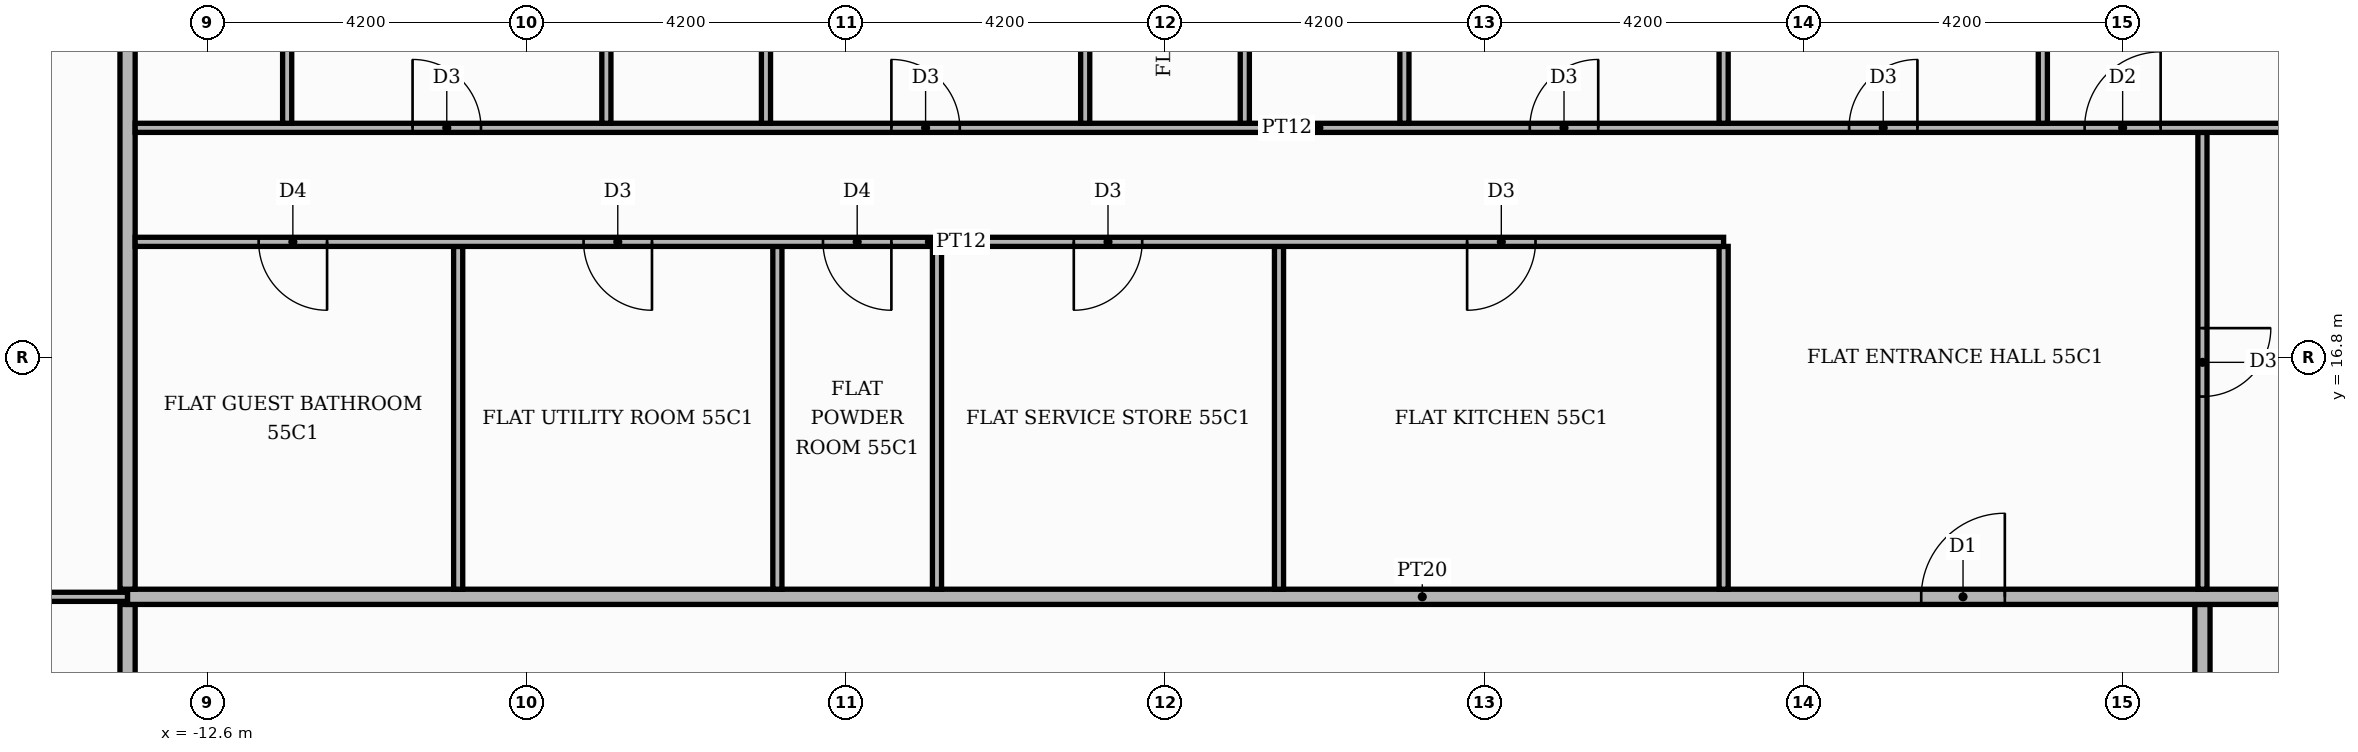
"""IFC4 building model, lengths in metres.
Left out: names, types, materials, properties, quantities, classifications, styles, units other than length and angle.
Written with IfcOpenShell. Run it as: python <this file> out.ifc"""

import sys

from ifc_helpers import new_model, si_unit, direction, frame, frame_2d, origin, place, context, subcontext, project, spatial, rectangle, extrude, element, fill, save


model = new_model("IFC4")
c1 = context("Model", 3, precision=1e-05, world=origin(), true_north=direction((0.0, 1.0)))
c2 = subcontext(c1, "Body", "Model", "MODEL_VIEW")
j1 = project(units=[si_unit("LENGTHUNIT", "METRE"), si_unit("PLANEANGLEUNIT", "RADIAN")], contexts=[c1])
p1 = place(None, origin())
s1 = spatial("IfcSite", under=j1, at=p1, CompositionType="ELEMENT")
p2 = place(p1, origin())
s2 = spatial("IfcBuilding", under=s1, at=p2, CompositionType="ELEMENT")
p3 = place(p2, frame((0.0, 0.0, 231.3)))
s3 = spatial("IfcBuildingStorey", under=s2, at=p3, CompositionType="ELEMENT", Elevation=231.3)
p4 = place(p3, frame((-13.65, -13.55, 0.0), z_axis=(0.0, 0.0, 1.0), x_axis=(0.0, 1.0, 0.0)))
e1 = element("IfcWall", 1, at=p4, inside=s3, PredefinedType="PARTITIONING", context=c2, shape_type="SweptSolid", body=[
    extrude(rectangle(XDim=27.1, YDim=0.2, at=frame_2d((13.55, 0.0))), origin(), (0.0, 0.0, 1.0), 3.4),
])
p5 = place(p4, frame((23.5, 0.0, 0.0)))
e2 = element("IfcOpeningElement", 2, at=p5, cuts=e1, PredefinedType="OPENING", context=c2, shape_type="SweptSolid", body=[
    extrude(rectangle(XDim=1.1, YDim=2.4, at=frame_2d((0.55, 1.2))), frame((0.0, 0.11, 0.0), z_axis=(0.0, -1.0, 0.0), x_axis=(1.0, 0.0, 0.0)), (0.0, 0.0, 1.0), 0.22),
])
p6 = place(p3, frame((13.65, 11.1, 0.0), z_axis=(0.0, 0.0, 1.0), x_axis=(0.0, 1.0, 0.0)))
e3 = element("IfcWall", 3, at=p6, inside=s3, PredefinedType="PARTITIONING", context=c2, shape_type="SweptSolid", body=[
    extrude(rectangle(XDim=2.45, YDim=0.2, at=frame_2d((1.225, 0.0))), origin(), (0.0, 0.0, 1.0), 3.4),
])
p7 = place(p3, frame((-20.12, 13.65, 0.0), z_axis=(0.0, 0.0, 1.0), x_axis=(1.0, 0.0, 0.0)))
e4 = element("IfcWall", 4, at=p7, inside=s3, PredefinedType="PARTITIONING", context=c2, shape_type="SweptSolid", body=[
    extrude(rectangle(XDim=6.47, YDim=0.12, at=frame_2d((3.235, 0.0))), origin(), (0.0, 0.0, 1.0), 3.4),
])
p8 = place(p7, frame((2.785, 0.0, 0.0)))
e5 = element("IfcOpeningElement", 5, at=p8, cuts=e4, PredefinedType="OPENING", context=c2, shape_type="SweptSolid", body=[
    extrude(rectangle(XDim=0.9, YDim=2.1, at=frame_2d((0.45, 1.05))), frame((0.0, 0.07, 0.0), z_axis=(0.0, -1.0, 0.0), x_axis=(1.0, 0.0, 0.0)), (0.0, 0.0, 1.0), 0.14),
])
p9 = place(p3, frame((-13.65, 13.65, 0.0), z_axis=(0.0, 0.0, 1.0), x_axis=(1.0, 0.0, 0.0)))
e6 = element("IfcWall", 6, at=p9, inside=s3, PredefinedType="PARTITIONING", context=c2, shape_type="SweptSolid", body=[
    extrude(rectangle(XDim=34.07, YDim=0.2, at=frame_2d((17.035, 0.0))), origin(), (0.0, 0.0, 1.0), 3.4),
])
p10 = place(p9, frame((23.6, 0.0, 0.0)))
e7 = element("IfcOpeningElement", 7, at=p10, cuts=e6, PredefinedType="OPENING", context=c2, shape_type="SweptSolid", body=[
    extrude(rectangle(XDim=1.1, YDim=2.4, at=frame_2d((0.55, 1.2))), frame((0.0, 0.11, 0.0), z_axis=(0.0, -1.0, 0.0), x_axis=(1.0, 0.0, 0.0)), (0.0, 0.0, 1.0), 0.22),
])
p11 = place(p3, frame((-13.65, 13.75, 0.0), z_axis=(0.0, 0.0, 1.0), x_axis=(0.0, 1.0, 0.0)))
e8 = element("IfcWall", 8, at=p11, inside=s3, PredefinedType="PARTITIONING", context=c2, shape_type="SweptSolid", body=[
    extrude(rectangle(XDim=11.67, YDim=0.2, at=frame_2d((5.835, 0.0))), origin(), (0.0, 0.0, 1.0), 3.4),
])
for number, where, z_axis, x_axis in (
    (9, (-9.3, 13.75, 0.0), (0.0, 0.0, 1.0), (0.0, 1.0, 0.0)),
    (10, (-5.1, 13.75, 0.0), (0.0, 0.0, 1.0), (0.0, 1.0, 0.0)),
    (11, (-3.0, 13.75, 0.0), (0.0, 0.0, 1.0), (0.0, 1.0, 0.0)),
    (12, (1.5, 13.75, 0.0), (0.0, 0.0, 1.0), (0.0, 1.0, 0.0)),
    (13, (7.35, 13.75, 0.0), (0.0, 0.0, 1.0), (0.0, 1.0, 0.0)),
):
    element("IfcWall", number, at=place(p3, frame(where, z_axis=z_axis, x_axis=x_axis)), inside=s3, PredefinedType="PARTITIONING", context=c2, shape_type="SweptSolid", body=[
        extrude(rectangle(XDim=4.51, YDim=0.12, at=frame_2d((2.255, 0.0))), origin(), (0.0, 0.0, 1.0), 3.4),
    ])
p12 = place(p3, frame((13.65, 13.75, 0.0), z_axis=(0.0, 0.0, 1.0), x_axis=(0.0, 1.0, 0.0)))
e14 = element("IfcWall", 14, at=p12, inside=s3, PredefinedType="PARTITIONING", context=c2, shape_type="SweptSolid", body=[
    extrude(rectangle(XDim=6.01, YDim=0.12, at=frame_2d((3.005, 0.0))), origin(), (0.0, 0.0, 1.0), 3.4),
])
p13 = place(p12, frame((2.535, 0.0, 0.0)))
e15 = element("IfcOpeningElement", 15, at=p13, cuts=e14, PredefinedType="OPENING", context=c2, shape_type="SweptSolid", body=[
    extrude(rectangle(XDim=0.9, YDim=2.1, at=frame_2d((0.45, 1.05))), frame((0.0, 0.07, 0.0), z_axis=(0.0, -1.0, 0.0), x_axis=(1.0, 0.0, 0.0)), (0.0, 0.0, 1.0), 0.14),
])
p14 = place(p3, frame((-13.55, 18.32, 0.0), z_axis=(0.0, 0.0, 1.0), x_axis=(1.0, 0.0, 0.0)))
e16 = element("IfcWall", 16, at=p14, inside=s3, PredefinedType="PARTITIONING", context=c2, shape_type="SweptSolid", body=[
    extrude(rectangle(XDim=20.9, YDim=0.12, at=frame_2d((10.45, 0.0))), origin(), (0.0, 0.0, 1.0), 3.4),
])
p15 = place(p14, frame((17.525, 0.0, 0.0)))
e17 = element("IfcOpeningElement", 17, at=p15, cuts=e16, PredefinedType="OPENING", context=c2, shape_type="SweptSolid", body=[
    extrude(rectangle(XDim=0.9, YDim=2.1, at=frame_2d((0.45, 1.05))), frame((0.0, 0.07, 0.0), z_axis=(0.0, -1.0, 0.0), x_axis=(1.0, 0.0, 0.0)), (0.0, 0.0, 1.0), 0.14),
])
p16 = place(p14, frame((12.35, 0.0, 0.0)))
e18 = element("IfcOpeningElement", 18, at=p16, cuts=e16, PredefinedType="OPENING", context=c2, shape_type="SweptSolid", body=[
    extrude(rectangle(XDim=0.9, YDim=2.1, at=frame_2d((0.45, 1.05))), frame((0.0, 0.07, 0.0), z_axis=(0.0, -1.0, 0.0), x_axis=(1.0, 0.0, 0.0)), (0.0, 0.0, 1.0), 0.14),
])
p17 = place(p14, frame((9.05, 0.0, 0.0)))
e19 = element("IfcOpeningElement", 19, at=p17, cuts=e16, PredefinedType="OPENING", context=c2, shape_type="SweptSolid", body=[
    extrude(rectangle(XDim=0.9, YDim=2.1, at=frame_2d((0.45, 1.05))), frame((0.0, 0.07, 0.0), z_axis=(0.0, -1.0, 0.0), x_axis=(1.0, 0.0, 0.0)), (0.0, 0.0, 1.0), 0.14),
])
p18 = place(p14, frame((5.9, 0.0, 0.0)))
e20 = element("IfcOpeningElement", 20, at=p18, cuts=e16, PredefinedType="OPENING", context=c2, shape_type="SweptSolid", body=[
    extrude(rectangle(XDim=0.9, YDim=2.1, at=frame_2d((0.45, 1.05))), frame((0.0, 0.07, 0.0), z_axis=(0.0, -1.0, 0.0), x_axis=(1.0, 0.0, 0.0)), (0.0, 0.0, 1.0), 0.14),
])
p19 = place(p14, frame((1.625, 0.0, 0.0)))
e21 = element("IfcOpeningElement", 21, at=p19, cuts=e16, PredefinedType="OPENING", context=c2, shape_type="SweptSolid", body=[
    extrude(rectangle(XDim=0.9, YDim=2.1, at=frame_2d((0.45, 1.05))), frame((0.0, 0.07, 0.0), z_axis=(0.0, -1.0, 0.0), x_axis=(1.0, 0.0, 0.0)), (0.0, 0.0, 1.0), 0.14),
])
p20 = place(p3, frame((-13.55, 19.82, 0.0), z_axis=(0.0, 0.0, 1.0), x_axis=(1.0, 0.0, 0.0)))
e22 = element("IfcWall", 22, at=p20, inside=s3, PredefinedType="PARTITIONING", context=c2, shape_type="SweptSolid", body=[
    extrude(rectangle(XDim=31.15, YDim=0.12, at=frame_2d((15.575, 0.0))), origin(), (0.0, 0.0, 1.0), 3.4),
])
p21 = place(p20, frame((25.65, 0.0, 0.0)))
e23 = element("IfcOpeningElement", 23, at=p21, cuts=e22, PredefinedType="OPENING", context=c2, shape_type="SweptSolid", body=[
    extrude(rectangle(XDim=1.0, YDim=2.1, at=frame_2d((0.5, 1.05))), frame((0.0, 0.07, 0.0), z_axis=(0.0, -1.0, 0.0), x_axis=(1.0, 0.0, 0.0)), (0.0, 0.0, 1.0), 0.14),
])
p22 = place(p20, frame((22.55, 0.0, 0.0)))
e24 = element("IfcOpeningElement", 24, at=p22, cuts=e22, PredefinedType="OPENING", context=c2, shape_type="SweptSolid", body=[
    extrude(rectangle(XDim=0.9, YDim=2.1, at=frame_2d((0.45, 1.05))), frame((0.0, 0.07, 0.0), z_axis=(0.0, -1.0, 0.0), x_axis=(1.0, 0.0, 0.0)), (0.0, 0.0, 1.0), 0.14),
])
p23 = place(p20, frame((18.35, 0.0, 0.0)))
e25 = element("IfcOpeningElement", 25, at=p23, cuts=e22, PredefinedType="OPENING", context=c2, shape_type="SweptSolid", body=[
    extrude(rectangle(XDim=0.9, YDim=2.1, at=frame_2d((0.45, 1.05))), frame((0.0, 0.07, 0.0), z_axis=(0.0, -1.0, 0.0), x_axis=(1.0, 0.0, 0.0)), (0.0, 0.0, 1.0), 0.14),
])
p24 = place(p20, frame((9.95, 0.0, 0.0)))
e26 = element("IfcOpeningElement", 26, at=p24, cuts=e22, PredefinedType="OPENING", context=c2, shape_type="SweptSolid", body=[
    extrude(rectangle(XDim=0.9, YDim=2.1, at=frame_2d((0.45, 1.05))), frame((0.0, 0.07, 0.0), z_axis=(0.0, -1.0, 0.0), x_axis=(1.0, 0.0, 0.0)), (0.0, 0.0, 1.0), 0.14),
])
p25 = place(p20, frame((3.65, 0.0, 0.0)))
e27 = element("IfcOpeningElement", 27, at=p25, cuts=e22, PredefinedType="OPENING", context=c2, shape_type="SweptSolid", body=[
    extrude(rectangle(XDim=0.9, YDim=2.1, at=frame_2d((0.45, 1.05))), frame((0.0, 0.07, 0.0), z_axis=(0.0, -1.0, 0.0), x_axis=(1.0, 0.0, 0.0)), (0.0, 0.0, 1.0), 0.14),
])
p26 = place(p3, frame((-11.55, 19.88, 0.0), z_axis=(0.0, 0.0, 1.0), x_axis=(0.0, 1.0, 0.0)))
e28 = element("IfcWall", 28, at=p26, inside=s3, PredefinedType="PARTITIONING", context=c2, shape_type="SweptSolid", body=[
    extrude(rectangle(XDim=5.54, YDim=0.12, at=frame_2d((2.77, 0.0))), origin(), (0.0, 0.0, 1.0), 3.4),
])
p27 = place(p26, frame((2.44, 0.0, 0.0)))
e29 = element("IfcOpeningElement", 29, at=p27, cuts=e28, PredefinedType="OPENING", context=c2, shape_type="SweptSolid", body=[
    extrude(rectangle(XDim=0.9, YDim=2.1, at=frame_2d((0.45, 1.05))), frame((0.0, 0.07, 0.0), z_axis=(0.0, -1.0, 0.0), x_axis=(1.0, 0.0, 0.0)), (0.0, 0.0, 1.0), 0.14),
])
p28 = place(p3, frame((-7.35, 19.88, 0.0), z_axis=(0.0, 0.0, 1.0), x_axis=(0.0, 1.0, 0.0)))
e30 = element("IfcWall", 30, at=p28, inside=s3, PredefinedType="PARTITIONING", context=c2, shape_type="SweptSolid", body=[
    extrude(rectangle(XDim=5.54, YDim=0.12, at=frame_2d((2.77, 0.0))), origin(), (0.0, 0.0, 1.0), 3.4),
])
p29 = place(p3, frame((-5.25, 19.88, 0.0), z_axis=(0.0, 0.0, 1.0), x_axis=(0.0, 1.0, 0.0)))
e31 = element("IfcWall", 31, at=p29, inside=s3, PredefinedType="PARTITIONING", context=c2, shape_type="SweptSolid", body=[
    extrude(rectangle(XDim=5.54, YDim=0.12, at=frame_2d((2.77, 0.0))), origin(), (0.0, 0.0, 1.0), 3.4),
])
p30 = place(p29, frame((2.44, 0.0, 0.0)))
e32 = element("IfcOpeningElement", 32, at=p30, cuts=e31, PredefinedType="OPENING", context=c2, shape_type="SweptSolid", body=[
    extrude(rectangle(XDim=0.9, YDim=2.1, at=frame_2d((0.45, 1.05))), frame((0.0, 0.07, 0.0), z_axis=(0.0, -1.0, 0.0), x_axis=(1.0, 0.0, 0.0)), (0.0, 0.0, 1.0), 0.14),
])
p31 = place(p3, frame((-1.05, 19.88, 0.0), z_axis=(0.0, 0.0, 1.0), x_axis=(0.0, 1.0, 0.0)))
e33 = element("IfcWall", 33, at=p31, inside=s3, PredefinedType="PARTITIONING", context=c2, shape_type="SweptSolid", body=[
    extrude(rectangle(XDim=5.54, YDim=0.12, at=frame_2d((2.77, 0.0))), origin(), (0.0, 0.0, 1.0), 3.4),
])
p32 = place(p3, frame((1.05, 19.88, 0.0), z_axis=(0.0, 0.0, 1.0), x_axis=(0.0, 1.0, 0.0)))
e34 = element("IfcWall", 34, at=p32, inside=s3, PredefinedType="PARTITIONING", context=c2, shape_type="SweptSolid", body=[
    extrude(rectangle(XDim=5.54, YDim=0.12, at=frame_2d((2.77, 0.0))), origin(), (0.0, 0.0, 1.0), 3.4),
])
p33 = place(p32, frame((2.44, 0.0, 0.0)))
e35 = element("IfcOpeningElement", 35, at=p33, cuts=e34, PredefinedType="OPENING", context=c2, shape_type="SweptSolid", body=[
    extrude(rectangle(XDim=0.9, YDim=2.1, at=frame_2d((0.45, 1.05))), frame((0.0, 0.07, 0.0), z_axis=(0.0, -1.0, 0.0), x_axis=(1.0, 0.0, 0.0)), (0.0, 0.0, 1.0), 0.14),
])
p34 = place(p3, frame((3.15, 19.88, 0.0), z_axis=(0.0, 0.0, 1.0), x_axis=(0.0, 1.0, 0.0)))
e36 = element("IfcWall", 36, at=p34, inside=s3, PredefinedType="PARTITIONING", context=c2, shape_type="SweptSolid", body=[
    extrude(rectangle(XDim=5.54, YDim=0.12, at=frame_2d((2.77, 0.0))), origin(), (0.0, 0.0, 1.0), 3.4),
])
p35 = place(p34, frame((2.44, 0.0, 0.0)))
e37 = element("IfcOpeningElement", 37, at=p35, cuts=e36, PredefinedType="OPENING", context=c2, shape_type="SweptSolid", body=[
    extrude(rectangle(XDim=0.9, YDim=2.1, at=frame_2d((0.45, 1.05))), frame((0.0, 0.07, 0.0), z_axis=(0.0, -1.0, 0.0), x_axis=(1.0, 0.0, 0.0)), (0.0, 0.0, 1.0), 0.14),
])
for number, where, z_axis, x_axis in (
    (38, (7.35, 19.88, 0.0), (0.0, 0.0, 1.0), (0.0, 1.0, 0.0)),
    (39, (11.55, 19.88, 0.0), (0.0, 0.0, 1.0), (0.0, 1.0, 0.0)),
):
    element("IfcWall", number, at=place(p3, frame(where, z_axis=z_axis, x_axis=x_axis)), inside=s3, PredefinedType="PARTITIONING", context=c2, shape_type="SweptSolid", body=[
        extrude(rectangle(XDim=5.54, YDim=0.12, at=frame_2d((2.77, 0.0))), origin(), (0.0, 0.0, 1.0), 3.4),
    ])
p36 = place(p10, origin())
e40 = element("IfcDoor", 40, at=p36, inside=s3, OperationType="SINGLE_SWING_RIGHT", PredefinedType="DOOR", context=c2, shape_type="SweptSolid", body=[
    extrude(rectangle(XDim=1.1, YDim=2.4, at=frame_2d((0.55, 1.2))), frame((0.0, 0.025, 0.0), z_axis=(0.0, -1.0, 0.0), x_axis=(1.0, 0.0, 0.0)), (0.0, 0.0, 1.0), 0.05),
])
fill(e7, e40)
p37 = place(p13, frame((0.9, 0.0, 0.0), z_axis=(0.0, 0.0, 1.0), x_axis=(-1.0, 0.0, 0.0)))
e41 = element("IfcDoor", 41, at=p37, inside=s3, OperationType="SINGLE_SWING_RIGHT", PredefinedType="DOOR", context=c2, shape_type="SweptSolid", body=[
    extrude(rectangle(XDim=0.9, YDim=2.1, at=frame_2d((0.45, 1.05))), frame((0.0, 0.025, 0.0), z_axis=(0.0, -1.0, 0.0), x_axis=(1.0, 0.0, 0.0)), (0.0, 0.0, 1.0), 0.05),
])
fill(e15, e41)
p38 = place(p15, frame((0.9, 0.0, 0.0), z_axis=(0.0, 0.0, 1.0), x_axis=(-1.0, 0.0, 0.0)))
e42 = element("IfcDoor", 42, at=p38, inside=s3, OperationType="SINGLE_SWING_LEFT", PredefinedType="DOOR", context=c2, shape_type="SweptSolid", body=[
    extrude(rectangle(XDim=0.9, YDim=2.1, at=frame_2d((0.45, 1.05))), frame((0.0, 0.025, 0.0), z_axis=(0.0, -1.0, 0.0), x_axis=(1.0, 0.0, 0.0)), (0.0, 0.0, 1.0), 0.05),
])
fill(e17, e42)
p39 = place(p16, frame((0.9, 0.0, 0.0), z_axis=(0.0, 0.0, 1.0), x_axis=(-1.0, 0.0, 0.0)))
e43 = element("IfcDoor", 43, at=p39, inside=s3, OperationType="SINGLE_SWING_LEFT", PredefinedType="DOOR", context=c2, shape_type="SweptSolid", body=[
    extrude(rectangle(XDim=0.9, YDim=2.1, at=frame_2d((0.45, 1.05))), frame((0.0, 0.025, 0.0), z_axis=(0.0, -1.0, 0.0), x_axis=(1.0, 0.0, 0.0)), (0.0, 0.0, 1.0), 0.05),
])
fill(e18, e43)
p40 = place(p17, frame((0.9, 0.0, 0.0), z_axis=(0.0, 0.0, 1.0), x_axis=(-1.0, 0.0, 0.0)))
e44 = element("IfcDoor", 44, at=p40, inside=s3, OperationType="SINGLE_SWING_RIGHT", PredefinedType="DOOR", context=c2, shape_type="SweptSolid", body=[
    extrude(rectangle(XDim=0.9, YDim=2.1, at=frame_2d((0.45, 1.05))), frame((0.0, 0.025, 0.0), z_axis=(0.0, -1.0, 0.0), x_axis=(1.0, 0.0, 0.0)), (0.0, 0.0, 1.0), 0.05),
])
fill(e19, e44)
p41 = place(p18, frame((0.9, 0.0, 0.0), z_axis=(0.0, 0.0, 1.0), x_axis=(-1.0, 0.0, 0.0)))
e45 = element("IfcDoor", 45, at=p41, inside=s3, OperationType="SINGLE_SWING_RIGHT", PredefinedType="DOOR", context=c2, shape_type="SweptSolid", body=[
    extrude(rectangle(XDim=0.9, YDim=2.1, at=frame_2d((0.45, 1.05))), frame((0.0, 0.025, 0.0), z_axis=(0.0, -1.0, 0.0), x_axis=(1.0, 0.0, 0.0)), (0.0, 0.0, 1.0), 0.05),
])
fill(e20, e45)
p42 = place(p19, frame((0.9, 0.0, 0.0), z_axis=(0.0, 0.0, 1.0), x_axis=(-1.0, 0.0, 0.0)))
e46 = element("IfcDoor", 46, at=p42, inside=s3, OperationType="SINGLE_SWING_RIGHT", PredefinedType="DOOR", context=c2, shape_type="SweptSolid", body=[
    extrude(rectangle(XDim=0.9, YDim=2.1, at=frame_2d((0.45, 1.05))), frame((0.0, 0.025, 0.0), z_axis=(0.0, -1.0, 0.0), x_axis=(1.0, 0.0, 0.0)), (0.0, 0.0, 1.0), 0.05),
])
fill(e21, e46)
p43 = place(p21, origin())
e47 = element("IfcDoor", 47, at=p43, inside=s3, OperationType="SINGLE_SWING_RIGHT", PredefinedType="DOOR", context=c2, shape_type="SweptSolid", body=[
    extrude(rectangle(XDim=1.0, YDim=2.1, at=frame_2d((0.5, 1.05))), frame((0.0, 0.025, 0.0), z_axis=(0.0, -1.0, 0.0), x_axis=(1.0, 0.0, 0.0)), (0.0, 0.0, 1.0), 0.05),
])
fill(e23, e47)
p44 = place(p22, origin())
e48 = element("IfcDoor", 48, at=p44, inside=s3, OperationType="SINGLE_SWING_RIGHT", PredefinedType="DOOR", context=c2, shape_type="SweptSolid", body=[
    extrude(rectangle(XDim=0.9, YDim=2.1, at=frame_2d((0.45, 1.05))), frame((0.0, 0.025, 0.0), z_axis=(0.0, -1.0, 0.0), x_axis=(1.0, 0.0, 0.0)), (0.0, 0.0, 1.0), 0.05),
])
fill(e24, e48)
p45 = place(p23, origin())
e49 = element("IfcDoor", 49, at=p45, inside=s3, OperationType="SINGLE_SWING_RIGHT", PredefinedType="DOOR", context=c2, shape_type="SweptSolid", body=[
    extrude(rectangle(XDim=0.9, YDim=2.1, at=frame_2d((0.45, 1.05))), frame((0.0, 0.025, 0.0), z_axis=(0.0, -1.0, 0.0), x_axis=(1.0, 0.0, 0.0)), (0.0, 0.0, 1.0), 0.05),
])
fill(e25, e49)
p46 = place(p24, origin())
e50 = element("IfcDoor", 50, at=p46, inside=s3, OperationType="SINGLE_SWING_LEFT", PredefinedType="DOOR", context=c2, shape_type="SweptSolid", body=[
    extrude(rectangle(XDim=0.9, YDim=2.1, at=frame_2d((0.45, 1.05))), frame((0.0, 0.025, 0.0), z_axis=(0.0, -1.0, 0.0), x_axis=(1.0, 0.0, 0.0)), (0.0, 0.0, 1.0), 0.05),
])
fill(e26, e50)
p47 = place(p25, origin())
e51 = element("IfcDoor", 51, at=p47, inside=s3, OperationType="SINGLE_SWING_LEFT", PredefinedType="DOOR", context=c2, shape_type="SweptSolid", body=[
    extrude(rectangle(XDim=0.9, YDim=2.1, at=frame_2d((0.45, 1.05))), frame((0.0, 0.025, 0.0), z_axis=(0.0, -1.0, 0.0), x_axis=(1.0, 0.0, 0.0)), (0.0, 0.0, 1.0), 0.05),
])
fill(e27, e51)
save(model, sys.argv[1])
